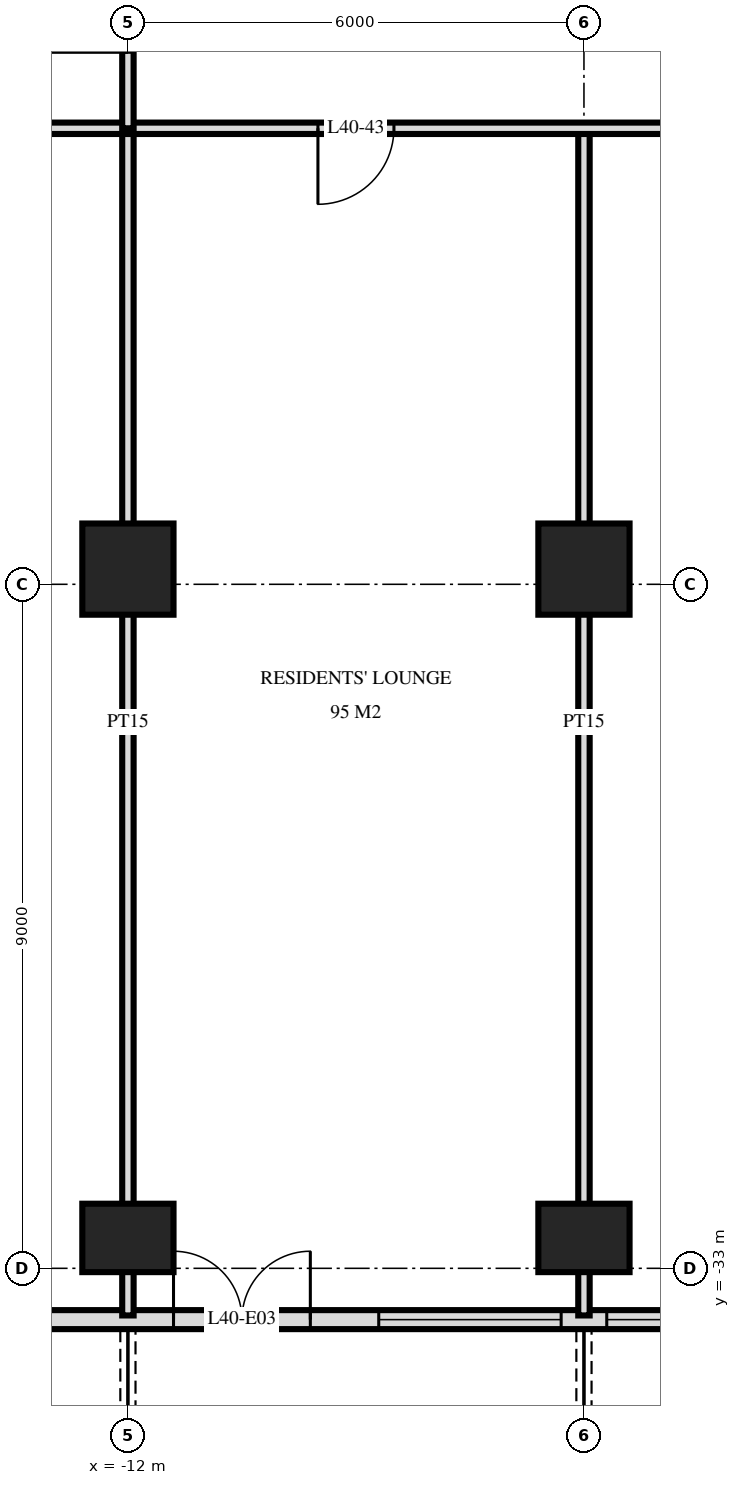
"""IFC4 building model, lengths in metres.
Left out: names, types, materials, properties, quantities, classifications, styles, units other than length and angle.
Written with IfcOpenShell. Run it as: python <this file> out.ifc"""

import sys

from ifc_helpers import new_model, si_unit, direction, frame, frame_2d, origin, origin_2d, place, context, subcontext, project, spatial, rectangle, extrude, element, fill, save


model = new_model("IFC4")
c1 = context("Model", 3, precision=1e-05, world=origin(), true_north=direction((0.0, 1.0)))
c2 = subcontext(c1, "Body", "Model", "MODEL_VIEW")
j1 = project(units=[si_unit("LENGTHUNIT", "METRE"), si_unit("PLANEANGLEUNIT", "RADIAN")], contexts=[c1])
p1 = place(None, origin())
s1 = spatial("IfcSite", under=j1, at=p1, CompositionType="ELEMENT")
p2 = place(p1, origin())
s2 = spatial("IfcBuilding", under=s1, at=p2, CompositionType="ELEMENT")
p3 = place(p2, frame((0.0, 0.0, 156.0)))
s3 = spatial("IfcBuildingStorey", under=s2, at=p3, CompositionType="ELEMENT", Elevation=156.0)
p4 = place(p3, frame((-12.0, -32.6, 0.0), z_axis=(0.0, 0.0, 1.0), x_axis=(1.0, 0.0, 0.0)))
e1 = element("IfcColumn", 1, at=p4, inside=s3, PredefinedType="COLUMN", context=c2, shape_type="SweptSolid", body=[
    extrude(rectangle(XDim=1.2, YDim=0.9, at=origin_2d()), origin(), (0.0, 0.0, 1.0), 3.6),
])
p5 = place(p3, frame((-12.0, -23.8, 0.0), z_axis=(0.0, 0.0, 1.0), x_axis=(1.0, 0.0, 0.0)))
e2 = element("IfcColumn", 2, at=p5, inside=s3, PredefinedType="COLUMN", context=c2, shape_type="SweptSolid", body=[
    extrude(rectangle(XDim=1.2, YDim=1.2, at=origin_2d()), origin(), (0.0, 0.0, 1.0), 3.6),
])
p6 = place(p3, frame((-6.0, -32.6, 0.0), z_axis=(0.0, 0.0, 1.0), x_axis=(1.0, 0.0, 0.0)))
e3 = element("IfcColumn", 3, at=p6, inside=s3, PredefinedType="COLUMN", context=c2, shape_type="SweptSolid", body=[
    extrude(rectangle(XDim=1.2, YDim=0.9, at=origin_2d()), origin(), (0.0, 0.0, 1.0), 3.6),
])
p7 = place(p3, frame((-6.0, -23.8, 0.0), z_axis=(0.0, 0.0, 1.0), x_axis=(1.0, 0.0, 0.0)))
e4 = element("IfcColumn", 4, at=p7, inside=s3, PredefinedType="COLUMN", context=c2, shape_type="SweptSolid", body=[
    extrude(rectangle(XDim=1.2, YDim=1.2, at=origin_2d()), origin(), (0.0, 0.0, 1.0), 3.6),
])
p8 = place(p3, frame((-23.675, -33.675, 0.0), z_axis=(0.0, 0.0, 1.0), x_axis=(1.0, 0.0, 0.0)))
e5 = element("IfcWall", 5, at=p8, inside=s3, PredefinedType="SOLIDWALL", context=c2, shape_type="SweptSolid", body=[
    extrude(rectangle(XDim=47.351, YDim=0.25, at=frame_2d((23.675, 0.0))), origin(), (0.0, 0.0, 1.0), 3.32),
])
p9 = place(p8, frame((0.275, 0.0, 0.3)))
e6 = element("IfcOpeningElement", 6, at=p9, cuts=e5, PredefinedType="OPENING", context=c2, shape_type="SweptSolid", body=[
    extrude(rectangle(XDim=2.4, YDim=2.1, at=frame_2d((1.2, 1.05))), frame((0.0, 0.135, 0.0), z_axis=(0.0, -1.0, 0.0), x_axis=(1.0, 0.0, 0.0)), (0.0, 0.0, 1.0), 0.27),
])
p10 = place(p8, frame((3.425, 0.0, 0.0)))
e7 = element("IfcOpeningElement", 7, at=p10, cuts=e5, PredefinedType="OPENING", context=c2, shape_type="SweptSolid", body=[
    extrude(rectangle(XDim=1.8, YDim=2.4, at=frame_2d((0.9, 1.2))), frame((0.0, 0.135, 0.0), z_axis=(0.0, -1.0, 0.0), x_axis=(1.0, 0.0, 0.0)), (0.0, 0.0, 1.0), 0.27),
])
p11 = place(p8, frame((7.775, 0.0, 0.0)))
e8 = element("IfcOpeningElement", 8, at=p11, cuts=e5, PredefinedType="OPENING", context=c2, shape_type="SweptSolid", body=[
    extrude(rectangle(XDim=1.8, YDim=2.4, at=frame_2d((0.9, 1.2))), frame((0.0, 0.135, 0.0), z_axis=(0.0, -1.0, 0.0), x_axis=(1.0, 0.0, 0.0)), (0.0, 0.0, 1.0), 0.27),
])
p12 = place(p8, frame((12.275, 0.0, 0.0)))
e9 = element("IfcOpeningElement", 9, at=p12, cuts=e5, PredefinedType="OPENING", context=c2, shape_type="SweptSolid", body=[
    extrude(rectangle(XDim=1.8, YDim=2.4, at=frame_2d((0.9, 1.2))), frame((0.0, 0.135, 0.0), z_axis=(0.0, -1.0, 0.0), x_axis=(1.0, 0.0, 0.0)), (0.0, 0.0, 1.0), 0.27),
])
p13 = place(p8, frame((14.975, 0.0, 0.3)))
e10 = element("IfcOpeningElement", 10, at=p13, cuts=e5, PredefinedType="OPENING", context=c2, shape_type="SweptSolid", body=[
    extrude(rectangle(XDim=2.4, YDim=2.1, at=frame_2d((1.2, 1.05))), frame((0.0, 0.135, 0.0), z_axis=(0.0, -1.0, 0.0), x_axis=(1.0, 0.0, 0.0)), (0.0, 0.0, 1.0), 0.27),
])
p14 = place(p8, frame((17.975, 0.0, 0.3)))
e11 = element("IfcOpeningElement", 11, at=p14, cuts=e5, PredefinedType="OPENING", context=c2, shape_type="SweptSolid", body=[
    extrude(rectangle(XDim=2.4, YDim=2.1, at=frame_2d((1.2, 1.05))), frame((0.0, 0.135, 0.0), z_axis=(0.0, -1.0, 0.0), x_axis=(1.0, 0.0, 0.0)), (0.0, 0.0, 1.0), 0.27),
])
p15 = place(p8, frame((21.275, 0.0, 0.0)))
e12 = element("IfcOpeningElement", 12, at=p15, cuts=e5, PredefinedType="OPENING", context=c2, shape_type="SweptSolid", body=[
    extrude(rectangle(XDim=1.8, YDim=2.4, at=frame_2d((0.9, 1.2))), frame((0.0, 0.135, 0.0), z_axis=(0.0, -1.0, 0.0), x_axis=(1.0, 0.0, 0.0)), (0.0, 0.0, 1.0), 0.27),
])
p16 = place(p8, frame((24.275, 0.0, 0.0)))
e13 = element("IfcOpeningElement", 13, at=p16, cuts=e5, PredefinedType="OPENING", context=c2, shape_type="SweptSolid", body=[
    extrude(rectangle(XDim=1.8, YDim=2.4, at=frame_2d((0.9, 1.2))), frame((0.0, 0.135, 0.0), z_axis=(0.0, -1.0, 0.0), x_axis=(1.0, 0.0, 0.0)), (0.0, 0.0, 1.0), 0.27),
])
p17 = place(p8, frame((26.975, 0.0, 0.3)))
e14 = element("IfcOpeningElement", 14, at=p17, cuts=e5, PredefinedType="OPENING", context=c2, shape_type="SweptSolid", body=[
    extrude(rectangle(XDim=2.4, YDim=2.1, at=frame_2d((1.2, 1.05))), frame((0.0, 0.135, 0.0), z_axis=(0.0, -1.0, 0.0), x_axis=(1.0, 0.0, 0.0)), (0.0, 0.0, 1.0), 0.27),
])
p18 = place(p8, frame((30.275, 0.0, 0.0)))
e15 = element("IfcOpeningElement", 15, at=p18, cuts=e5, PredefinedType="OPENING", context=c2, shape_type="SweptSolid", body=[
    extrude(rectangle(XDim=1.8, YDim=2.4, at=frame_2d((0.9, 1.2))), frame((0.0, 0.135, 0.0), z_axis=(0.0, -1.0, 0.0), x_axis=(1.0, 0.0, 0.0)), (0.0, 0.0, 1.0), 0.27),
])
p19 = place(p8, frame((32.975, 0.0, 0.3)))
e16 = element("IfcOpeningElement", 16, at=p19, cuts=e5, PredefinedType="OPENING", context=c2, shape_type="SweptSolid", body=[
    extrude(rectangle(XDim=2.4, YDim=2.1, at=frame_2d((1.2, 1.05))), frame((0.0, 0.135, 0.0), z_axis=(0.0, -1.0, 0.0), x_axis=(1.0, 0.0, 0.0)), (0.0, 0.0, 1.0), 0.27),
])
p20 = place(p8, frame((36.275, 0.0, 0.0)))
e17 = element("IfcOpeningElement", 17, at=p20, cuts=e5, PredefinedType="OPENING", context=c2, shape_type="SweptSolid", body=[
    extrude(rectangle(XDim=1.8, YDim=2.4, at=frame_2d((0.9, 1.2))), frame((0.0, 0.135, 0.0), z_axis=(0.0, -1.0, 0.0), x_axis=(1.0, 0.0, 0.0)), (0.0, 0.0, 1.0), 0.27),
])
p21 = place(p8, frame((38.975, 0.0, 0.3)))
e18 = element("IfcOpeningElement", 18, at=p21, cuts=e5, PredefinedType="OPENING", context=c2, shape_type="SweptSolid", body=[
    extrude(rectangle(XDim=2.4, YDim=2.1, at=frame_2d((1.2, 1.05))), frame((0.0, 0.135, 0.0), z_axis=(0.0, -1.0, 0.0), x_axis=(1.0, 0.0, 0.0)), (0.0, 0.0, 1.0), 0.27),
])
p22 = place(p8, frame((41.975, 0.0, 0.3)))
e19 = element("IfcOpeningElement", 19, at=p22, cuts=e5, PredefinedType="OPENING", context=c2, shape_type="SweptSolid", body=[
    extrude(rectangle(XDim=2.4, YDim=2.1, at=frame_2d((1.2, 1.05))), frame((0.0, 0.135, 0.0), z_axis=(0.0, -1.0, 0.0), x_axis=(1.0, 0.0, 0.0)), (0.0, 0.0, 1.0), 0.27),
])
p23 = place(p8, frame((45.125, 0.0, 0.0)))
e20 = element("IfcOpeningElement", 20, at=p23, cuts=e5, PredefinedType="OPENING", context=c2, shape_type="SweptSolid", body=[
    extrude(rectangle(XDim=1.8, YDim=2.4, at=frame_2d((0.9, 1.2))), frame((0.0, 0.135, 0.0), z_axis=(0.0, -1.0, 0.0), x_axis=(1.0, 0.0, 0.0)), (0.0, 0.0, 1.0), 0.27),
])
p24 = place(p3, frame((-6.0, -33.62, 0.0), z_axis=(0.0, 0.0, 1.0), x_axis=(0.0, 1.0, 0.0)))
e21 = element("IfcWall", 21, at=p24, inside=s3, PredefinedType="PARTITIONING", context=c2, shape_type="SweptSolid", body=[
    extrude(rectangle(XDim=15.62, YDim=0.15, at=frame_2d((7.81, 0.0))), origin(), (0.0, 0.0, 1.0), 3.32),
])
p25 = place(p3, frame((-12.0, -18.0, 0.0), z_axis=(0.0, 0.0, 1.0), x_axis=(0.0, 1.0, 0.0)))
e22 = element("IfcWall", 22, at=p25, inside=s3, PredefinedType="PARTITIONING", context=c2, shape_type="SweptSolid", body=[
    extrude(rectangle(XDim=2.95, YDim=0.15, at=frame_2d((1.475, 0.0))), origin(), (0.0, 0.0, 1.0), 3.32),
])
p26 = place(p25, frame((1.0, 0.0, 0.0)))
e23 = element("IfcOpeningElement", 23, at=p26, cuts=e22, PredefinedType="OPENING", context=c2, shape_type="SweptSolid", body=[
    extrude(rectangle(XDim=1.0, YDim=2.1, at=frame_2d((0.5, 1.05))), frame((0.0, 0.085, 0.0), z_axis=(0.0, -1.0, 0.0), x_axis=(1.0, 0.0, 0.0)), (0.0, 0.0, 1.0), 0.17),
])
p27 = place(p3, frame((-12.0, -33.62, 0.0), z_axis=(0.0, 0.0, 1.0), x_axis=(0.0, 1.0, 0.0)))
e24 = element("IfcWall", 24, at=p27, inside=s3, PredefinedType="PARTITIONING", context=c2, shape_type="SweptSolid", body=[
    extrude(rectangle(XDim=15.62, YDim=0.15, at=frame_2d((7.81, 0.0))), origin(), (0.0, 0.0, 1.0), 3.32),
])
p28 = place(p3, frame((-28.02, -18.0, 0.0), z_axis=(0.0, 0.0, 1.0), x_axis=(1.0, 0.0, 0.0)))
e25 = element("IfcWall", 25, at=p28, inside=s3, PredefinedType="PARTITIONING", context=c2, shape_type="SweptSolid", body=[
    extrude(rectangle(XDim=56.04, YDim=0.15, at=frame_2d((28.02, 0.0))), origin(), (0.0, 0.0, 1.0), 3.32),
])
p29 = place(p28, frame((12.52, 0.0, 0.0)))
e26 = element("IfcOpeningElement", 26, at=p29, cuts=e25, PredefinedType="OPENING", context=c2, shape_type="SweptSolid", body=[
    extrude(rectangle(XDim=1.0, YDim=2.1, at=frame_2d((0.5, 1.05))), frame((0.0, 0.085, 0.0), z_axis=(0.0, -1.0, 0.0), x_axis=(1.0, 0.0, 0.0)), (0.0, 0.0, 1.0), 0.17),
])
p30 = place(p28, frame((8.32, 0.0, 0.0)))
e27 = element("IfcOpeningElement", 27, at=p30, cuts=e25, PredefinedType="OPENING", context=c2, shape_type="SweptSolid", body=[
    extrude(rectangle(XDim=1.0, YDim=2.1, at=frame_2d((0.5, 1.05))), frame((0.0, 0.085, 0.0), z_axis=(0.0, -1.0, 0.0), x_axis=(1.0, 0.0, 0.0)), (0.0, 0.0, 1.0), 0.17),
])
p31 = place(p28, frame((40.17, 0.0, 0.0)))
e28 = element("IfcOpeningElement", 28, at=p31, cuts=e25, PredefinedType="OPENING", context=c2, shape_type="SweptSolid", body=[
    extrude(rectangle(XDim=1.0, YDim=2.1, at=frame_2d((0.5, 1.05))), frame((0.0, 0.085, 0.0), z_axis=(0.0, -1.0, 0.0), x_axis=(1.0, 0.0, 0.0)), (0.0, 0.0, 1.0), 0.17),
])
p32 = place(p28, frame((44.87, 0.0, 0.0)))
e29 = element("IfcOpeningElement", 29, at=p32, cuts=e25, PredefinedType="OPENING", context=c2, shape_type="SweptSolid", body=[
    extrude(rectangle(XDim=1.0, YDim=2.1, at=frame_2d((0.5, 1.05))), frame((0.0, 0.085, 0.0), z_axis=(0.0, -1.0, 0.0), x_axis=(1.0, 0.0, 0.0)), (0.0, 0.0, 1.0), 0.17),
])
p33 = place(p28, frame((46.72, 0.0, 0.0)))
e30 = element("IfcOpeningElement", 30, at=p33, cuts=e25, PredefinedType="OPENING", context=c2, shape_type="SweptSolid", body=[
    extrude(rectangle(XDim=1.0, YDim=2.1, at=frame_2d((0.5, 1.05))), frame((0.0, 0.085, 0.0), z_axis=(0.0, -1.0, 0.0), x_axis=(1.0, 0.0, 0.0)), (0.0, 0.0, 1.0), 0.17),
])
p34 = place(p28, frame((18.52, 0.0, 0.0)))
e31 = element("IfcOpeningElement", 31, at=p34, cuts=e25, PredefinedType="OPENING", context=c2, shape_type="SweptSolid", body=[
    extrude(rectangle(XDim=1.0, YDim=2.1, at=frame_2d((0.5, 1.05))), frame((0.0, 0.085, 0.0), z_axis=(0.0, -1.0, 0.0), x_axis=(1.0, 0.0, 0.0)), (0.0, 0.0, 1.0), 0.17),
])
p35 = place(p28, frame((24.52, 0.0, 0.0)))
e32 = element("IfcOpeningElement", 32, at=p35, cuts=e25, PredefinedType="OPENING", context=c2, shape_type="SweptSolid", body=[
    extrude(rectangle(XDim=1.0, YDim=2.1, at=frame_2d((0.5, 1.05))), frame((0.0, 0.085, 0.0), z_axis=(0.0, -1.0, 0.0), x_axis=(1.0, 0.0, 0.0)), (0.0, 0.0, 1.0), 0.17),
])
p36 = place(p28, frame((30.52, 0.0, 0.0)))
e33 = element("IfcOpeningElement", 33, at=p36, cuts=e25, PredefinedType="OPENING", context=c2, shape_type="SweptSolid", body=[
    extrude(rectangle(XDim=1.0, YDim=2.1, at=frame_2d((0.5, 1.05))), frame((0.0, 0.085, 0.0), z_axis=(0.0, -1.0, 0.0), x_axis=(1.0, 0.0, 0.0)), (0.0, 0.0, 1.0), 0.17),
])
p37 = place(p28, frame((36.52, 0.0, 0.0)))
e34 = element("IfcOpeningElement", 34, at=p37, cuts=e25, PredefinedType="OPENING", context=c2, shape_type="SweptSolid", body=[
    extrude(rectangle(XDim=1.0, YDim=2.1, at=frame_2d((0.5, 1.05))), frame((0.0, 0.085, 0.0), z_axis=(0.0, -1.0, 0.0), x_axis=(1.0, 0.0, 0.0)), (0.0, 0.0, 1.0), 0.17),
])
p38 = place(p12, origin())
e35 = element("IfcDoor", 35, at=p38, inside=s3, OperationType="DOUBLE_DOOR_SINGLE_SWING", PredefinedType="DOOR", context=c2, shape_type="SweptSolid", body=[
    extrude(rectangle(XDim=1.8, YDim=2.4, at=frame_2d((0.9, 1.2))), frame((0.0, 0.025, 0.0), z_axis=(0.0, -1.0, 0.0), x_axis=(1.0, 0.0, 0.0)), (0.0, 0.0, 1.0), 0.05),
])
fill(e9, e35)
p39 = place(p13, origin())
e36 = element("IfcWindow", 36, at=p39, inside=s3, PartitioningType="SINGLE_PANEL", PredefinedType="WINDOW", context=c2, shape_type="SweptSolid", body=[
    extrude(rectangle(XDim=2.4, YDim=2.1, at=frame_2d((1.2, 1.05))), frame((0.0, 0.03, 0.0), z_axis=(0.0, -1.0, 0.0), x_axis=(1.0, 0.0, 0.0)), (0.0, 0.0, 1.0), 0.06),
])
fill(e10, e36)
p40 = place(p14, origin())
e37 = element("IfcWindow", 37, at=p40, inside=s3, PartitioningType="SINGLE_PANEL", PredefinedType="WINDOW", context=c2, shape_type="SweptSolid", body=[
    extrude(rectangle(XDim=2.4, YDim=2.1, at=frame_2d((1.2, 1.05))), frame((0.0, 0.03, 0.0), z_axis=(0.0, -1.0, 0.0), x_axis=(1.0, 0.0, 0.0)), (0.0, 0.0, 1.0), 0.06),
])
fill(e11, e37)
p41 = place(p34, frame((0.5, 0.0, 0.0), z_axis=(0.0, 0.0, 1.0), x_axis=(-1.0, 0.0, 0.0)))
e38 = element("IfcDoor", 38, at=p41, inside=s3, OperationType="SINGLE_SWING_LEFT", PredefinedType="DOOR", context=c2, shape_type="SweptSolid", body=[
    extrude(rectangle(XDim=1.0, YDim=2.1, at=frame_2d((0.0, 1.05))), frame((0.0, -0.025, 0.0), z_axis=(0.0, 1.0, 0.0), x_axis=(-1.0, 0.0, 0.0)), (0.0, 0.0, 1.0), 0.05),
])
fill(e31, e38)
save(model, sys.argv[1])
